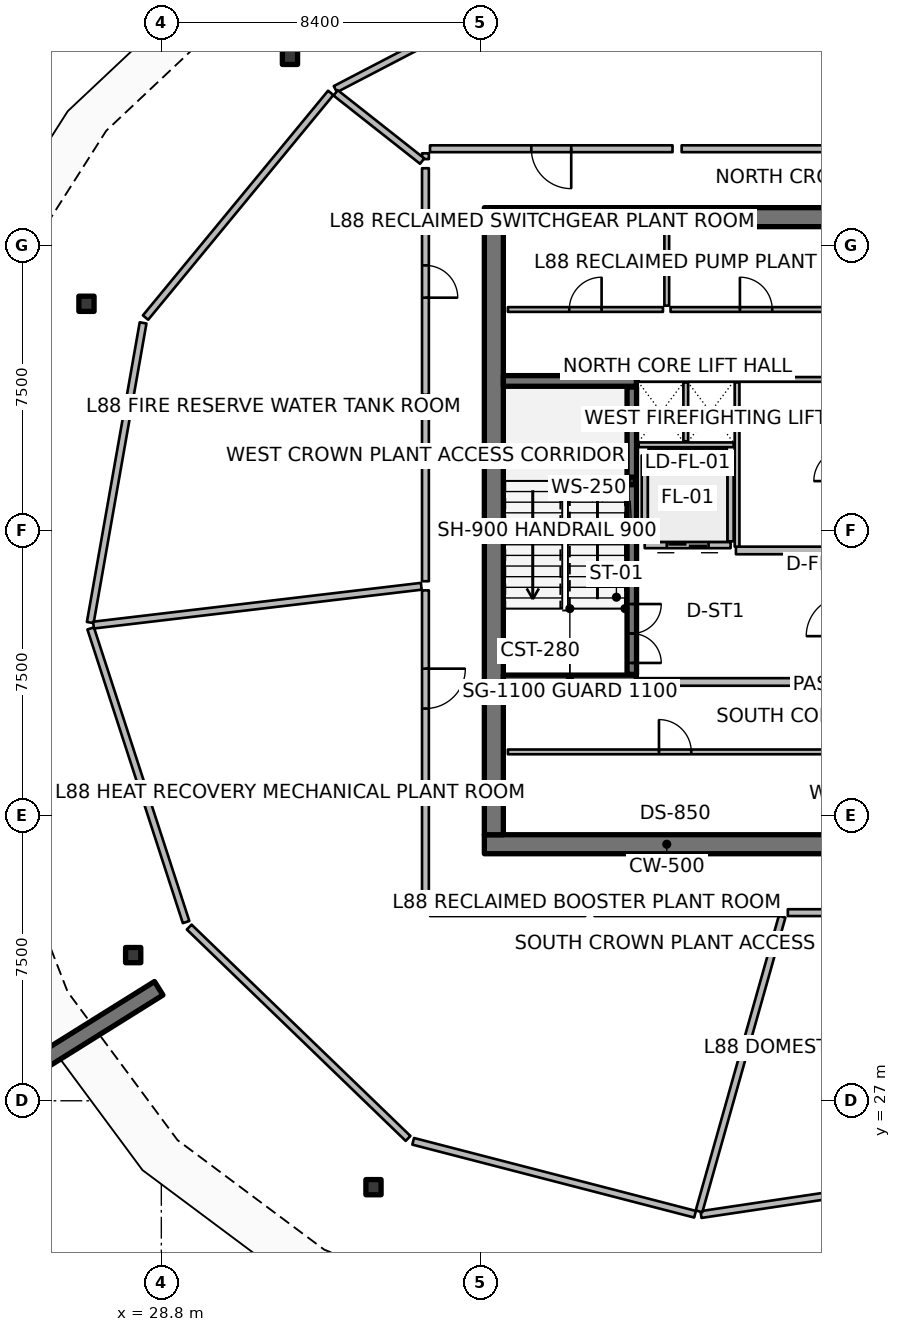
"""IFC4 building model, lengths in metres.
Left out: names, types, materials, properties, quantities, classifications, styles, units other than length and angle.
Written with IfcOpenShell. Run it as: python <this file> out.ifc"""

import sys

from ifc_helpers import new_model, si_unit, direction, frame, frame_2d, origin, origin_2d, place, context, subcontext, project, spatial, rectangle, hollow_rectangle, extrude, element, fill, save


model = new_model("IFC4")
c1 = context("Model", 3, precision=1e-05, world=origin(), true_north=direction((0.0, 1.0)))
c2 = subcontext(c1, "Body", "Model", "MODEL_VIEW")
j1 = project(units=[si_unit("LENGTHUNIT", "METRE"), si_unit("PLANEANGLEUNIT", "RADIAN")], contexts=[c1])
p1 = place(None, origin())
s1 = spatial("IfcSite", under=j1, at=p1, CompositionType="ELEMENT")
p2 = place(p1, origin())
s2 = spatial("IfcBuilding", under=s1, at=p2, CompositionType="ELEMENT")
p3 = place(p2, frame((0.0, 0.0, 351.5)))
s3 = spatial("IfcBuildingStorey", under=s2, at=p3, CompositionType="ELEMENT", Elevation=351.5)
for number, where, z_axis, x_axis in (
    (1, (37.3, 33.75, 0.0), (0.0, 0.0, 1.0), (1.0, 0.0, 0.0)),
    (2, (37.3, 50.25, 0.0), (0.0, 0.0, 1.0), (1.0, 0.0, 0.0)),
):
    element("IfcWall", number, at=place(p3, frame(where, z_axis=z_axis, x_axis=x_axis)), inside=s3, PredefinedType="SHEAR", context=c2, shape_type="SweptSolid", body=[
        extrude(rectangle(XDim=9.6, YDim=0.5, at=frame_2d((4.8, 0.0))), origin(), (0.0, 0.0, 1.0), 4.5),
    ])
p4 = place(p3, frame((37.55, 34.0, 0.0), z_axis=(0.0, 0.0, 1.0), x_axis=(0.0, 1.0, 0.0)))
e3 = element("IfcWall", 3, at=p4, inside=s3, PredefinedType="SHEAR", context=c2, shape_type="SweptSolid", body=[
    extrude(rectangle(XDim=16.0, YDim=0.5, at=frame_2d((8.0, 0.0))), origin(), (0.0, 0.0, 1.0), 4.5),
])
for number, where, z_axis, x_axis in (
    (4, (37.8, 38.06, 0.0), (0.0, 0.0, 1.0), (1.0, 0.0, 0.0)),
    (5, (37.8, 45.94, 0.0), (0.0, 0.0, 1.0), (1.0, 0.0, 0.0)),
):
    element("IfcWall", number, at=place(p3, frame(where, z_axis=z_axis, x_axis=x_axis)), inside=s3, PredefinedType="SHEAR", context=c2, shape_type="SweptSolid", body=[
        extrude(rectangle(XDim=3.5, YDim=0.28, at=frame_2d((1.75, 0.0))), origin(), (0.0, 0.0, 1.0), 4.5),
    ])
p5 = place(p3, frame((41.18, 43.31, 0.0), z_axis=(0.0, 0.0, 1.0), x_axis=(1.0, 0.0, 0.0)))
e6 = element("IfcColumn", 6, at=p5, inside=s3, PredefinedType="COLUMN", context=c2, shape_type="SweptSolid", body=[
    extrude(hollow_rectangle(XDim=0.2, YDim=0.2, WallThickness=0.01, InnerFilletRadius=0.01, OuterFilletRadius=0.02, at=origin_2d()), origin(), (0.0, 0.0, 1.0), 2.045),
])
p6 = place(p3, frame((28.731, 29.959, 0.0), z_axis=(0.0, 0.0, 1.0), x_axis=(-0.848033572426, -0.529942506352, 0.0)))
e7 = element("IfcWall", 7, at=p6, inside=s3, PredefinedType="SOLIDWALL", context=c2, shape_type="SweptSolid", body=[
    extrude(rectangle(XDim=3.5, YDim=0.42, at=frame_2d((1.75, 0.0))), origin(), (0.0, 0.0, 1.0), 4.5),
])
for number, where, z_axis, x_axis in (
    (8, (32.185, 54.468, 0.0), (0.0, 0.0, 1.0), (1.0, 0.0, 0.0)),
    (9, (26.83, 47.97, 0.0), (0.0, 0.0, 1.0), (1.0, 0.0, 0.0)),
    (10, (28.059, 30.833, 0.0), (0.0, 0.0, 1.0), (1.0, 0.0, 0.0)),
    (11, (34.383, 24.726, 0.0), (0.0, 0.0, 1.0), (1.0, 0.0, 0.0)),
):
    element("IfcColumn", number, at=place(p3, frame(where, z_axis=z_axis, x_axis=x_axis)), inside=s3, PredefinedType="COLUMN", context=c2, shape_type="SweptSolid", body=[
        extrude(hollow_rectangle(XDim=0.4, YDim=0.4, WallThickness=0.02, InnerFilletRadius=0.02, OuterFilletRadius=0.04, at=origin_2d()), origin(), (0.0, 0.0, 1.0), 4.22),
    ])
p7 = place(p3, frame((41.18, 38.22, 0.0), z_axis=(0.0, 0.0, 1.0), x_axis=(0.0, 1.0, 0.0)))
e12 = element("IfcWall", 12, at=p7, inside=s3, PredefinedType="SOLIDWALL", context=c2, shape_type="SweptSolid", body=[
    extrude(rectangle(XDim=7.56, YDim=0.25, at=frame_2d((3.78, 0.0))), origin(), (0.0, 0.0, 1.0), 4.22),
])
p8 = place(p7, frame((0.3, 0.0, 0.0)))
e13 = element("IfcOpeningElement", 13, at=p8, cuts=e12, PredefinedType="OPENING", context=c2, shape_type="SweptSolid", body=[
    extrude(rectangle(XDim=1.55, YDim=2.15, at=frame_2d((0.775, 1.075))), frame((0.0, 0.135, 0.0), z_axis=(0.0, -1.0, 0.0), x_axis=(1.0, 0.0, 0.0)), (0.0, 0.0, 1.0), 0.27),
])
p9 = place(p3, frame((43.78, 41.62, 0.0), z_axis=(0.0, 0.0, 1.0), x_axis=(-1.0, 0.0, 0.0)))
e14 = element("IfcWall", 14, at=p9, inside=s3, PredefinedType="PARTITIONING", context=c2, shape_type="SweptSolid", body=[
    extrude(rectangle(XDim=2.26, YDim=0.16, at=frame_2d((1.13, 0.0))), origin(), (0.0, 0.0, 1.0), 4.22),
])
p10 = place(p9, frame((0.58, 0.0, 0.0)))
e15 = element("IfcOpeningElement", 15, at=p10, cuts=e14, PredefinedType="OPENING", context=c2, shape_type="SweptSolid", body=[
    extrude(rectangle(XDim=1.1, YDim=2.1, at=frame_2d((0.55, 1.05))), frame((0.0, 0.09, 0.0), z_axis=(0.0, -1.0, 0.0), x_axis=(1.0, 0.0, 0.0)), (0.0, 0.0, 1.0), 0.18),
])
for number, where, z_axis, x_axis in (
    (16, (43.78, 41.72, 0.0), (0.0, 0.0, 1.0), (0.0, 1.0, 0.0)),
    (17, (41.52, 41.72, 0.0), (0.0, 0.0, 1.0), (0.0, 1.0, 0.0)),
):
    element("IfcWall", number, at=place(p3, frame(where, z_axis=z_axis, x_axis=x_axis)), inside=s3, PredefinedType="PARTITIONING", context=c2, shape_type="SweptSolid", body=[
        extrude(rectangle(XDim=2.26, YDim=0.16, at=frame_2d((1.13, 0.0))), origin(), (0.0, 0.0, 1.0), 4.22),
    ])
p11 = place(p3, frame((41.62, 44.08, 0.0), z_axis=(0.0, 0.0, 1.0), x_axis=(1.0, 0.0, 0.0)))
e18 = element("IfcWall", 18, at=p11, inside=s3, PredefinedType="PARTITIONING", context=c2, shape_type="SweptSolid", body=[
    extrude(rectangle(XDim=2.06, YDim=0.16, at=frame_2d((1.03, 0.0))), origin(), (0.0, 0.0, 1.0), 4.22),
])
p12 = place(p3, frame((37.92, 36.18, 0.0), z_axis=(0.0, 0.0, 1.0), x_axis=(1.0, 0.0, 0.0)))
e19 = element("IfcWall", 19, at=p12, inside=s3, PredefinedType="PARTITIONING", context=c2, shape_type="SweptSolid", body=[
    extrude(rectangle(XDim=8.8, YDim=0.125, at=frame_2d((4.4, 0.0))), origin(), (0.0, 0.0, 1.0), 3.66),
])
p13 = place(p12, frame((3.975, 0.0, 0.0)))
e20 = element("IfcOpeningElement", 20, at=p13, cuts=e19, PredefinedType="OPENING", context=c2, shape_type="SweptSolid", body=[
    extrude(rectangle(XDim=0.85, YDim=2.06, at=frame_2d((0.425, 1.03))), frame((0.0, 0.073, 0.0), z_axis=(0.0, -1.0, 0.0), x_axis=(1.0, 0.0, 0.0)), (0.0, 0.0, 1.0), 0.145),
])
p14 = place(p3, frame((42.1, 47.92, 0.0), z_axis=(0.0, 0.0, 1.0), x_axis=(0.0, 1.0, 0.0)))
e21 = element("IfcWall", 21, at=p14, inside=s3, PredefinedType="PARTITIONING", context=c2, shape_type="SweptSolid", body=[
    extrude(rectangle(XDim=2.03, YDim=0.125, at=frame_2d((1.015, 0.0))), origin(), (0.0, 0.0, 1.0), 3.66),
])
p15 = place(p3, frame((37.92, 47.82, 0.0), z_axis=(0.0, 0.0, 1.0), x_axis=(1.0, 0.0, 0.0)))
e22 = element("IfcWall", 22, at=p15, inside=s3, PredefinedType="PARTITIONING", context=c2, shape_type="SweptSolid", body=[
    extrude(rectangle(XDim=4.08, YDim=0.125, at=frame_2d((2.04, 0.0))), origin(), (0.0, 0.0, 1.0), 3.66),
])
p16 = place(p15, frame((1.615, 0.0, 0.0)))
e23 = element("IfcOpeningElement", 23, at=p16, cuts=e22, PredefinedType="OPENING", context=c2, shape_type="SweptSolid", body=[
    extrude(rectangle(XDim=0.85, YDim=2.06, at=frame_2d((0.425, 1.03))), frame((0.0, 0.073, 0.0), z_axis=(0.0, -1.0, 0.0), x_axis=(1.0, 0.0, 0.0)), (0.0, 0.0, 1.0), 0.145),
])
p17 = place(p3, frame((42.2, 47.82, 0.0), z_axis=(0.0, 0.0, 1.0), x_axis=(1.0, 0.0, 0.0)))
e24 = element("IfcWall", 24, at=p17, inside=s3, PredefinedType="PARTITIONING", context=c2, shape_type="SweptSolid", body=[
    extrude(rectangle(XDim=4.5, YDim=0.125, at=frame_2d((2.25, 0.0))), origin(), (0.0, 0.0, 1.0), 3.66),
])
p18 = place(p17, frame((1.825, 0.0, 0.0)))
e25 = element("IfcOpeningElement", 25, at=p18, cuts=e24, PredefinedType="OPENING", context=c2, shape_type="SweptSolid", body=[
    extrude(rectangle(XDim=0.85, YDim=2.06, at=frame_2d((0.425, 1.03))), frame((0.0, 0.073, 0.0), z_axis=(0.0, -1.0, 0.0), x_axis=(1.0, 0.0, 0.0)), (0.0, 0.0, 1.0), 0.145),
])
p19 = place(p3, frame((41.35, 38.02, 0.0), z_axis=(0.0, 0.0, 1.0), x_axis=(1.0, 0.0, 0.0)))
e26 = element("IfcWall", 26, at=p19, inside=s3, PredefinedType="PARTITIONING", context=c2, shape_type="SweptSolid", body=[
    extrude(rectangle(XDim=5.37, YDim=0.2, at=frame_2d((2.685, 0.0))), origin(), (0.0, 0.0, 1.0), 4.22),
])
p20 = place(p3, frame((43.92, 41.48, 0.0), z_axis=(0.0, 0.0, 1.0), x_axis=(1.0, 0.0, 0.0)))
e27 = element("IfcWall", 27, at=p20, inside=s3, PredefinedType="PARTITIONING", context=c2, shape_type="SweptSolid", body=[
    extrude(rectangle(XDim=2.8, YDim=0.2, at=frame_2d((1.4, 0.0))), origin(), (0.0, 0.0, 1.0), 4.22),
])
p21 = place(p3, frame((41.36, 45.98, 0.0), z_axis=(0.0, 0.0, 1.0), x_axis=(1.0, 0.0, 0.0)))
e28 = element("IfcWall", 28, at=p21, inside=s3, PredefinedType="PARTITIONING", context=c2, shape_type="SweptSolid", body=[
    extrude(rectangle(XDim=5.36, YDim=0.125, at=frame_2d((2.68, 0.0))), origin(), (0.0, 0.0, 1.0), 3.66),
])
p22 = place(p3, frame((41.36, 44.26, 0.0), z_axis=(0.0, 0.0, 1.0), x_axis=(1.0, 0.0, 0.0)))
e29 = element("IfcWall", 29, at=p22, inside=s3, PredefinedType="PARTITIONING", context=c2, shape_type="SweptSolid", body=[
    extrude(rectangle(XDim=2.5, YDim=0.125, at=frame_2d((1.25, 0.0))), origin(), (0.0, 0.0, 1.0), 3.66),
])
p23 = place(p3, frame((42.6, 44.35, 0.0), z_axis=(0.0, 0.0, 1.0), x_axis=(0.0, 1.0, 0.0)))
e30 = element("IfcWall", 30, at=p23, inside=s3, PredefinedType="PARTITIONING", context=c2, shape_type="SweptSolid", body=[
    extrude(rectangle(XDim=1.55, YDim=0.125, at=frame_2d((0.775, 0.0))), origin(), (0.0, 0.0, 1.0), 3.66),
])
p24 = place(p3, frame((43.95, 41.58, 0.0), z_axis=(0.0, 0.0, 1.0), x_axis=(0.0, 1.0, 0.0)))
e31 = element("IfcWall", 31, at=p24, inside=s3, PredefinedType="PARTITIONING", context=c2, shape_type="SweptSolid", body=[
    extrude(rectangle(XDim=4.32, YDim=0.125, at=frame_2d((2.16, 0.0))), origin(), (0.0, 0.0, 1.0), 3.66),
])
p25 = place(p3, frame((39.59, 56.853, 0.0), z_axis=(0.0, 0.0, 1.0), x_axis=(-0.886949494865, -0.461866423935, 0.0)))
e32 = element("IfcWall", 32, at=p25, inside=s3, PredefinedType="PARTITIONING", context=c2, shape_type="SweptSolid", body=[
    extrude(rectangle(XDim=7.002, YDim=0.18, at=frame_2d((3.501, 0.0))), origin(), (0.0, 0.0, 1.0), 3.213),
])
p26 = place(p3, frame((33.258, 53.52, 0.0), z_axis=(0.0, 0.0, 1.0), x_axis=(-0.636018833443, -0.771673534278, 0.0)))
e33 = element("IfcWall", 33, at=p26, inside=s3, PredefinedType="PARTITIONING", context=c2, shape_type="SweptSolid", body=[
    extrude(rectangle(XDim=7.661, YDim=0.18, at=frame_2d((3.831, 0.0))), origin(), (0.0, 0.0, 1.0), 3.213),
])
p27 = place(p3, frame((28.32, 47.468, 0.0), z_axis=(0.0, 0.0, 1.0), x_axis=(-0.173668776466, -0.984804120666, 0.0)))
e34 = element("IfcWall", 34, at=p27, inside=s3, PredefinedType="PARTITIONING", context=c2, shape_type="SweptSolid", body=[
    extrude(rectangle(XDim=8.006, YDim=0.18, at=frame_2d((4.003, 0.0))), origin(), (0.0, 0.0, 1.0), 3.213),
])
p28 = place(p3, frame((26.941, 39.428, 0.0), z_axis=(0.0, 0.0, 1.0), x_axis=(0.309024234991, -0.951054163646, 0.0)))
e35 = element("IfcWall", 35, at=p28, inside=s3, PredefinedType="PARTITIONING", context=c2, shape_type="SweptSolid", body=[
    extrude(rectangle(XDim=8.124, YDim=0.18, at=frame_2d((4.062, 0.0))), origin(), (0.0, 0.0, 1.0), 3.213),
])
p29 = place(p3, frame((29.533, 31.57, 0.0), z_axis=(0.0, 0.0, 1.0), x_axis=(0.719364153135, -0.694633151516, 0.0)))
e36 = element("IfcWall", 36, at=p29, inside=s3, PredefinedType="PARTITIONING", context=c2, shape_type="SweptSolid", body=[
    extrude(rectangle(XDim=8.006, YDim=0.18, at=frame_2d((4.003, 0.0))), origin(), (0.0, 0.0, 1.0), 3.213),
])
p30 = place(p3, frame((35.427, 25.934, 0.0), z_axis=(0.0, 0.0, 1.0), x_axis=(0.968117205342, -0.250497658115, 0.0)))
e37 = element("IfcWall", 37, at=p30, inside=s3, PredefinedType="PARTITIONING", context=c2, shape_type="SweptSolid", body=[
    extrude(rectangle(XDim=7.662, YDim=0.18, at=frame_2d((3.831, 0.0))), origin(), (0.0, 0.0, 1.0), 3.213),
])
p31 = place(p3, frame((43.001, 24.006, 0.0), z_axis=(0.0, 0.0, 1.0), x_axis=(0.989034336252, 0.147685753256, 0.0)))
e38 = element("IfcWall", 38, at=p31, inside=s3, PredefinedType="PARTITIONING", context=c2, shape_type="SweptSolid", body=[
    extrude(rectangle(XDim=7.003, YDim=0.18, at=frame_2d((3.501, 0.0))), origin(), (0.0, 0.0, 1.0), 3.213),
])
p32 = place(p3, frame((46.798, 52.159, 0.0), z_axis=(0.0, 0.0, 1.0), x_axis=(-0.117541495417, 0.993067971921, 0.0)))
e39 = element("IfcWall", 39, at=p32, inside=s3, PredefinedType="PARTITIONING", context=c2, shape_type="SweptSolid", body=[
    extrude(rectangle(XDim=6.736, YDim=0.18, at=frame_2d((3.368, 0.0))), origin(), (0.0, 0.0, 1.0), 3.213),
])
p33 = place(p3, frame((46.69, 52.05, 0.0), z_axis=(0.0, 0.0, 1.0), x_axis=(-1.0, 0.0, 0.0)))
e40 = element("IfcWall", 40, at=p33, inside=s3, PredefinedType="PARTITIONING", context=c2, shape_type="SweptSolid", body=[
    extrude(rectangle(XDim=4.199, YDim=0.18, at=frame_2d((2.099, 0.0))), origin(), (0.0, 0.0, 1.0), 3.213),
])
p34 = place(p3, frame((42.252, 52.05, 0.0), z_axis=(0.0, 0.0, 1.0), x_axis=(-1.0, 0.0, 0.0)))
e41 = element("IfcWall", 41, at=p34, inside=s3, PredefinedType="PARTITIONING", context=c2, shape_type="SweptSolid", body=[
    extrude(rectangle(XDim=6.382, YDim=0.18, at=frame_2d((3.191, 0.0))), origin(), (0.0, 0.0, 1.0), 3.213),
])
p35 = place(p34, frame((2.666, 0.0, 0.0)))
e42 = element("IfcOpeningElement", 42, at=p35, cuts=e41, PredefinedType="OPENING", context=c2, shape_type="SweptSolid", body=[
    extrude(rectangle(XDim=1.05, YDim=2.1, at=frame_2d((0.525, 1.05))), frame((0.0, 0.1, 0.0), z_axis=(0.0, -1.0, 0.0), x_axis=(1.0, 0.0, 0.0)), (0.0, 0.0, 1.0), 0.2),
])
p36 = place(p3, frame((35.75, 51.93, 0.0), z_axis=(0.0, 0.0, 1.0), x_axis=(0.0, -1.0, 0.0)))
e43 = element("IfcWall", 43, at=p36, inside=s3, PredefinedType="PARTITIONING", context=c2, shape_type="SweptSolid", body=[
    extrude(rectangle(XDim=0.153, YDim=0.18, at=frame_2d((0.076, 0.0))), origin(), (0.0, 0.0, 1.0), 3.213),
])
p37 = place(p3, frame((35.664, 51.725, 0.0), z_axis=(0.0, 0.0, 1.0), x_axis=(-0.78528570066, 0.619133562601, 0.0)))
e44 = element("IfcWall", 44, at=p37, inside=s3, PredefinedType="PARTITIONING", context=c2, shape_type="SweptSolid", body=[
    extrude(rectangle(XDim=2.899, YDim=0.18, at=frame_2d((1.45, 0.0))), origin(), (0.0, 0.0, 1.0), 3.213),
])
p38 = place(p3, frame((35.75, 51.537, 0.0), z_axis=(0.0, 0.0, 1.0), x_axis=(0.0, -1.0, 0.0)))
e45 = element("IfcWall", 45, at=p38, inside=s3, PredefinedType="PARTITIONING", context=c2, shape_type="SweptSolid", body=[
    extrude(rectangle(XDim=5.962, YDim=0.18, at=frame_2d((2.981, 0.0))), origin(), (0.0, 0.0, 1.0), 3.213),
])
p39 = place(p38, frame((2.556, 0.0, 0.0)))
e46 = element("IfcOpeningElement", 46, at=p39, cuts=e45, PredefinedType="OPENING", context=c2, shape_type="SweptSolid", body=[
    extrude(rectangle(XDim=0.85, YDim=2.06, at=frame_2d((0.425, 1.03))), frame((0.0, 0.1, 0.0), z_axis=(0.0, -1.0, 0.0), x_axis=(1.0, 0.0, 0.0)), (0.0, 0.0, 1.0), 0.2),
])
p40 = place(p3, frame((35.75, 45.335, 0.0), z_axis=(0.0, 0.0, 1.0), x_axis=(0.0, -1.0, 0.0)))
e47 = element("IfcWall", 47, at=p40, inside=s3, PredefinedType="PARTITIONING", context=c2, shape_type="SweptSolid", body=[
    extrude(rectangle(XDim=4.665, YDim=0.18, at=frame_2d((2.333, 0.0))), origin(), (0.0, 0.0, 1.0), 3.213),
])
p41 = place(p3, frame((35.641, 40.537, 0.0), z_axis=(0.0, 0.0, 1.0), x_axis=(-0.993070751419, -0.117518010011, 0.0)))
e48 = element("IfcWall", 48, at=p41, inside=s3, PredefinedType="PARTITIONING", context=c2, shape_type="SweptSolid", body=[
    extrude(rectangle(XDim=8.686, YDim=0.18, at=frame_2d((4.343, 0.0))), origin(), (0.0, 0.0, 1.0), 3.213),
])
p42 = place(p3, frame((35.75, 40.43, 0.0), z_axis=(0.0, 0.0, 1.0), x_axis=(0.0, -1.0, 0.0)))
e49 = element("IfcWall", 49, at=p42, inside=s3, PredefinedType="PARTITIONING", context=c2, shape_type="SweptSolid", body=[
    extrude(rectangle(XDim=5.17, YDim=0.18, at=frame_2d((2.585, 0.0))), origin(), (0.0, 0.0, 1.0), 3.213),
])
p43 = place(p42, frame((2.06, 0.0, 0.0)))
e50 = element("IfcOpeningElement", 50, at=p43, cuts=e49, PredefinedType="OPENING", context=c2, shape_type="SweptSolid", body=[
    extrude(rectangle(XDim=1.05, YDim=2.1, at=frame_2d((0.525, 1.05))), frame((0.0, 0.1, 0.0), z_axis=(0.0, -1.0, 0.0), x_axis=(1.0, 0.0, 0.0)), (0.0, 0.0, 1.0), 0.2),
])
p44 = place(p3, frame((35.75, 35.02, 0.0), z_axis=(0.0, 0.0, 1.0), x_axis=(0.0, -1.0, 0.0)))
e51 = element("IfcWall", 51, at=p44, inside=s3, PredefinedType="PARTITIONING", context=c2, shape_type="SweptSolid", body=[
    extrude(rectangle(XDim=2.95, YDim=0.18, at=frame_2d((1.475, 0.0))), origin(), (0.0, 0.0, 1.0), 3.213),
])
p45 = place(p3, frame((35.87, 31.95, 0.0), z_axis=(0.0, 0.0, 1.0), x_axis=(1.0, 0.0, 0.0)))
e52 = element("IfcWall", 52, at=p45, inside=s3, PredefinedType="PARTITIONING", context=c2, shape_type="SweptSolid", body=[
    extrude(rectangle(XDim=4.087, YDim=0.18, at=frame_2d((2.043, 0.0))), origin(), (0.0, 0.0, 1.0), 3.213),
])
p46 = place(p3, frame((40.197, 31.95, 0.0), z_axis=(0.0, 0.0, 1.0), x_axis=(1.0, 0.0, 0.0)))
e53 = element("IfcWall", 53, at=p46, inside=s3, PredefinedType="PARTITIONING", context=c2, shape_type="SweptSolid", body=[
    extrude(rectangle(XDim=4.848, YDim=0.18, at=frame_2d((2.424, 0.0))), origin(), (0.0, 0.0, 1.0), 3.213),
])
p47 = place(p3, frame((45.136, 31.844, 0.0), z_axis=(0.0, 0.0, 1.0), x_axis=(-0.271457285698, -0.962450488099, 0.0)))
e54 = element("IfcWall", 54, at=p47, inside=s3, PredefinedType="PARTITIONING", context=c2, shape_type="SweptSolid", body=[
    extrude(rectangle(XDim=8.056, YDim=0.18, at=frame_2d((4.028, 0.0))), origin(), (0.0, 0.0, 1.0), 3.213),
])
p48 = place(p3, frame((45.286, 31.95, 0.0), z_axis=(0.0, 0.0, 1.0), x_axis=(1.0, 0.0, 0.0)))
e55 = element("IfcWall", 55, at=p48, inside=s3, PredefinedType="PARTITIONING", context=c2, shape_type="SweptSolid", body=[
    extrude(rectangle(XDim=3.784, YDim=0.18, at=frame_2d((1.892, 0.0))), origin(), (0.0, 0.0, 1.0), 3.213),
])
p49 = place(p8, origin())
e56 = element("IfcDoor", 56, at=p49, inside=s3, OperationType="DOUBLE_DOOR_SINGLE_SWING", PredefinedType="DOOR", context=c2, shape_type="SweptSolid", body=[
    extrude(rectangle(XDim=1.55, YDim=2.15, at=frame_2d((0.775, 1.075))), frame((0.0, 0.025, 0.0), z_axis=(0.0, -1.0, 0.0), x_axis=(1.0, 0.0, 0.0)), (0.0, 0.0, 1.0), 0.05),
])
fill(e13, e56)
p50 = place(p10, origin())
e57 = element("IfcDoor", 57, at=p50, inside=s3, OperationType="DOUBLE_DOOR_SLIDING", PredefinedType="DOOR", context=c2, shape_type="SweptSolid", body=[
    extrude(rectangle(XDim=1.1, YDim=2.1, at=frame_2d((0.55, 1.05))), frame((0.0, 0.025, 0.0), z_axis=(0.0, -1.0, 0.0), x_axis=(1.0, 0.0, 0.0)), (0.0, 0.0, 1.0), 0.05),
])
fill(e15, e57)
p51 = place(p13, origin())
e58 = element("IfcDoor", 58, at=p51, inside=s3, OperationType="SINGLE_SWING_LEFT", PredefinedType="DOOR", context=c2, shape_type="SweptSolid", body=[
    extrude(rectangle(XDim=0.85, YDim=2.06, at=frame_2d((0.425, 1.03))), frame((0.0, 0.025, 0.0), z_axis=(0.0, -1.0, 0.0), x_axis=(1.0, 0.0, 0.0)), (0.0, 0.0, 1.0), 0.05),
])
fill(e20, e58)
p52 = place(p16, origin())
e59 = element("IfcDoor", 59, at=p52, inside=s3, OperationType="SINGLE_SWING_RIGHT", PredefinedType="DOOR", context=c2, shape_type="SweptSolid", body=[
    extrude(rectangle(XDim=0.85, YDim=2.06, at=frame_2d((0.425, 1.03))), frame((0.0, 0.025, 0.0), z_axis=(0.0, -1.0, 0.0), x_axis=(1.0, 0.0, 0.0)), (0.0, 0.0, 1.0), 0.05),
])
fill(e23, e59)
p53 = place(p18, origin())
e60 = element("IfcDoor", 60, at=p53, inside=s3, OperationType="SINGLE_SWING_LEFT", PredefinedType="DOOR", context=c2, shape_type="SweptSolid", body=[
    extrude(rectangle(XDim=0.85, YDim=2.06, at=frame_2d((0.425, 1.03))), frame((0.0, 0.025, 0.0), z_axis=(0.0, -1.0, 0.0), x_axis=(1.0, 0.0, 0.0)), (0.0, 0.0, 1.0), 0.05),
])
fill(e25, e60)
p54 = place(p35, origin())
e61 = element("IfcDoor", 61, at=p54, inside=s3, OperationType="SINGLE_SWING_LEFT", PredefinedType="DOOR", context=c2, shape_type="SweptSolid", body=[
    extrude(rectangle(XDim=1.05, YDim=2.1, at=frame_2d((0.525, 1.05))), frame((0.0, 0.025, 0.0), z_axis=(0.0, -1.0, 0.0), x_axis=(1.0, 0.0, 0.0)), (0.0, 0.0, 1.0), 0.05),
])
fill(e42, e61)
p55 = place(p39, origin())
e62 = element("IfcDoor", 62, at=p55, inside=s3, OperationType="SINGLE_SWING_RIGHT", PredefinedType="DOOR", context=c2, shape_type="SweptSolid", body=[
    extrude(rectangle(XDim=0.85, YDim=2.06, at=frame_2d((0.425, 1.03))), frame((0.0, 0.025, 0.0), z_axis=(0.0, -1.0, 0.0), x_axis=(1.0, 0.0, 0.0)), (0.0, 0.0, 1.0), 0.05),
])
fill(e46, e62)
p56 = place(p43, origin())
e63 = element("IfcDoor", 63, at=p56, inside=s3, OperationType="SINGLE_SWING_LEFT", PredefinedType="DOOR", context=c2, shape_type="SweptSolid", body=[
    extrude(rectangle(XDim=1.05, YDim=2.1, at=frame_2d((0.525, 1.05))), frame((0.0, 0.025, 0.0), z_axis=(0.0, -1.0, 0.0), x_axis=(1.0, 0.0, 0.0)), (0.0, 0.0, 1.0), 0.05),
])
fill(e50, e63)
save(model, sys.argv[1])
